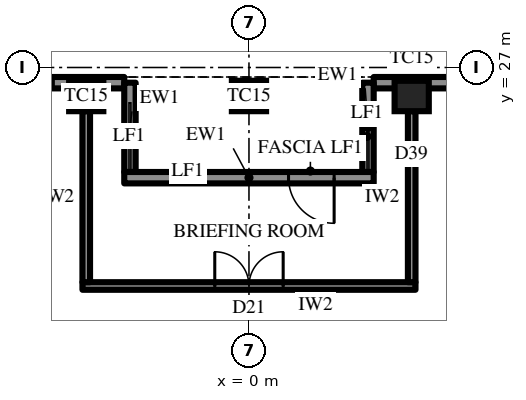
"""IFC4 building model, lengths in metres.
Left out: names, types, materials, properties, quantities, classifications, styles, units other than length and angle.
Written with IfcOpenShell. Run it as: python <this file> out.ifc"""

import sys

from ifc_helpers import new_model, si_unit, direction, frame, frame_2d, origin, origin_2d, place, context, subcontext, project, spatial, rectangle, extrude, element, fill, save


model = new_model("IFC4")
c1 = context("Model", 3, precision=1e-05, world=origin(), true_north=direction((0.0, 1.0)))
c2 = subcontext(c1, "Body", "Model", "MODEL_VIEW")
j1 = project(units=[si_unit("LENGTHUNIT", "METRE"), si_unit("PLANEANGLEUNIT", "RADIAN")], contexts=[c1])
p1 = place(None, origin())
s1 = spatial("IfcSite", under=j1, at=p1, CompositionType="ELEMENT")
p2 = place(p1, origin())
s2 = spatial("IfcBuilding", under=s1, at=p2, CompositionType="ELEMENT")
p3 = place(p2, frame((0.0, 0.0, 353.5)))
s3 = spatial("IfcBuildingStorey", under=s2, at=p3, CompositionType="ELEMENT", Elevation=353.5)
for number, where, z_axis, x_axis in (
    (1, (4.282, 26.25, 0.0), (0.0, 0.0, 1.0), (-1.0, 0.0, 0.0)),
    (2, (0.0, 26.25, 0.0), (0.0, 0.0, 1.0), (-1.0, 0.0, 0.0)),
    (3, (-4.282, 26.25, 0.0), (0.0, 0.0, 1.0), (-1.0, 0.0, 0.0)),
):
    element("IfcColumn", number, at=place(p3, frame(where, z_axis=z_axis, x_axis=x_axis)), inside=s3, PredefinedType="COLUMN", context=c2, shape_type="SweptSolid", body=[
        extrude(rectangle(XDim=0.9, YDim=0.8, at=origin_2d()), origin(), (0.0, 0.0, 1.0), 4.2),
    ])
p4 = place(p3, frame((12.846, 26.6, 0.0), z_axis=(0.0, 0.0, 1.0), x_axis=(-1.0, 0.0, 0.0)))
e4 = element("IfcWall", 4, at=p4, inside=s3, PredefinedType="SOLIDWALL", context=c2, shape_type="SweptSolid", body=[
    extrude(rectangle(XDim=9.564, YDim=0.3, at=frame_2d((4.782, 0.0))), origin(), (0.0, 0.0, 1.0), 2.9),
])
p5 = place(p4, frame((0.866, 0.0, 0.6)))
e5 = element("IfcOpeningElement", 5, at=p5, cuts=e4, PredefinedType="OPENING", context=c2, shape_type="SweptSolid", body=[
    extrude(rectangle(XDim=2.55, YDim=2.05, at=frame_2d((1.275, 1.025))), frame((0.0, 0.16, 0.0), z_axis=(0.0, -1.0, 0.0), x_axis=(1.0, 0.0, 0.0)), (0.0, 0.0, 1.0), 0.32),
])
p6 = place(p4, frame((5.823, 0.0, 0.0)))
e6 = element("IfcOpeningElement", 6, at=p6, cuts=e4, PredefinedType="OPENING", context=c2, shape_type="SweptSolid", body=[
    extrude(rectangle(XDim=1.2, YDim=2.4, at=frame_2d((0.6, 1.2))), frame((0.0, 0.16, 0.0), z_axis=(0.0, -1.0, 0.0), x_axis=(1.0, 0.0, 0.0)), (0.0, 0.0, 1.0), 0.32),
])
p7 = place(p3, frame((-3.282, 26.6, 0.0), z_axis=(0.0, 0.0, 1.0), x_axis=(-1.0, 0.0, 0.0)))
e7 = element("IfcWall", 7, at=p7, inside=s3, PredefinedType="SOLIDWALL", context=c2, shape_type="SweptSolid", body=[
    extrude(rectangle(XDim=9.564, YDim=0.3, at=frame_2d((4.782, 0.0))), origin(), (0.0, 0.0, 1.0), 2.9),
])
p8 = place(p7, frame((1.866, 0.0, 0.6)))
e8 = element("IfcOpeningElement", 8, at=p8, cuts=e7, PredefinedType="OPENING", context=c2, shape_type="SweptSolid", body=[
    extrude(rectangle(XDim=2.55, YDim=2.05, at=frame_2d((1.275, 1.025))), frame((0.0, 0.16, 0.0), z_axis=(0.0, -1.0, 0.0), x_axis=(1.0, 0.0, 0.0)), (0.0, 0.0, 1.0), 0.32),
])
p9 = place(p7, frame((6.148, 0.0, 0.6)))
e9 = element("IfcOpeningElement", 9, at=p9, cuts=e7, PredefinedType="OPENING", context=c2, shape_type="SweptSolid", body=[
    extrude(rectangle(XDim=2.55, YDim=2.05, at=frame_2d((1.275, 1.025))), frame((0.0, 0.16, 0.0), z_axis=(0.0, -1.0, 0.0), x_axis=(1.0, 0.0, 0.0)), (0.0, 0.0, 1.0), 0.32),
])
for number, where, z_axis, x_axis in (
    (10, (3.132, 26.6, 0.0), (0.0, 0.0, 1.0), (0.0, -1.0, 0.0)),
    (11, (-3.132, 26.6, 0.0), (0.0, 0.0, 1.0), (0.0, -1.0, 0.0)),
):
    element("IfcWall", number, at=place(p3, frame(where, z_axis=z_axis, x_axis=x_axis)), inside=s3, PredefinedType="SOLIDWALL", context=c2, shape_type="SweptSolid", body=[
        extrude(rectangle(XDim=2.35, YDim=0.3, at=frame_2d((1.175, 0.0))), origin(), (0.0, 0.0, 1.0), 2.9),
    ])
p10 = place(p3, frame((3.282, 24.1, 0.0), z_axis=(0.0, 0.0, 1.0), x_axis=(-1.0, 0.0, 0.0)))
e12 = element("IfcWall", 12, at=p10, inside=s3, PredefinedType="SOLIDWALL", context=c2, shape_type="SweptSolid", body=[
    extrude(rectangle(XDim=6.564, YDim=0.3, at=frame_2d((3.282, 0.0))), origin(), (0.0, 0.0, 1.0), 2.9),
])
p11 = place(p10, frame((1.041, 0.0, 0.0)))
e13 = element("IfcOpeningElement", 13, at=p11, cuts=e12, PredefinedType="OPENING", context=c2, shape_type="SweptSolid", body=[
    extrude(rectangle(XDim=1.2, YDim=2.4, at=frame_2d((0.6, 1.2))), frame((0.0, 0.16, 0.0), z_axis=(0.0, -1.0, 0.0), x_axis=(1.0, 0.0, 0.0)), (0.0, 0.0, 1.0), 0.32),
])
p12 = place(p3, frame((4.382, 21.25, 0.0), z_axis=(0.0, 0.0, 1.0), x_axis=(-1.0, 0.0, 0.0)))
e14 = element("IfcWall", 14, at=p12, inside=s3, PredefinedType="PARTITIONING", context=c2, shape_type="SweptSolid", body=[
    extrude(rectangle(XDim=8.764, YDim=0.2, at=frame_2d((4.382, 0.0))), origin(), (0.0, 0.0, 1.0), 4.0),
])
p13 = place(p12, frame((3.482, 0.0, 0.0)))
e15 = element("IfcOpeningElement", 15, at=p13, cuts=e14, PredefinedType="OPENING", context=c2, shape_type="SweptSolid", body=[
    extrude(rectangle(XDim=1.8, YDim=2.4, at=frame_2d((0.9, 1.2))), frame((0.0, 0.11, 0.0), z_axis=(0.0, -1.0, 0.0), x_axis=(1.0, 0.0, 0.0)), (0.0, 0.0, 1.0), 0.22),
])
for number, where, z_axis, x_axis in (
    (16, (4.282, 21.35, 0.0), (0.0, 0.0, 1.0), (0.0, 1.0, 0.0)),
    (17, (-4.282, 21.35, 0.0), (0.0, 0.0, 1.0), (0.0, 1.0, 0.0)),
):
    element("IfcWall", number, at=place(p3, frame(where, z_axis=z_axis, x_axis=x_axis)), inside=s3, PredefinedType="PARTITIONING", context=c2, shape_type="SweptSolid", body=[
        extrude(rectangle(XDim=4.5, YDim=0.2, at=frame_2d((2.25, 0.0))), origin(), (0.0, 0.0, 1.0), 2.992),
    ])
p14 = place(p8, origin())
e18 = element("IfcWindow", 18, at=p14, inside=s3, PartitioningType="SINGLE_PANEL", PredefinedType="WINDOW", context=c2, shape_type="SweptSolid", body=[
    extrude(rectangle(XDim=2.55, YDim=2.05, at=frame_2d((1.275, 1.025))), frame((0.0, 0.03, 0.0), z_axis=(0.0, -1.0, 0.0), x_axis=(1.0, 0.0, 0.0)), (0.0, 0.0, 1.0), 0.06),
])
fill(e8, e18)
p15 = place(p11, origin())
e19 = element("IfcDoor", 19, at=p15, inside=s3, OperationType="SINGLE_SWING_RIGHT", PredefinedType="DOOR", context=c2, shape_type="SweptSolid", body=[
    extrude(rectangle(XDim=1.2, YDim=2.4, at=frame_2d((0.6, 1.2))), frame((0.0, 0.025, 0.0), z_axis=(0.0, -1.0, 0.0), x_axis=(1.0, 0.0, 0.0)), (0.0, 0.0, 1.0), 0.05),
])
fill(e13, e19)
p16 = place(p13, frame((1.8, 0.0, 0.0), z_axis=(0.0, 0.0, 1.0), x_axis=(-1.0, 0.0, 0.0)))
e20 = element("IfcDoor", 20, at=p16, inside=s3, OperationType="DOUBLE_DOOR_SINGLE_SWING", PredefinedType="DOOR", context=c2, shape_type="SweptSolid", body=[
    extrude(rectangle(XDim=1.8, YDim=2.4, at=frame_2d((0.9, 1.2))), frame((0.0, 0.025, 0.0), z_axis=(0.0, -1.0, 0.0), x_axis=(1.0, 0.0, 0.0)), (0.0, 0.0, 1.0), 0.05),
])
fill(e15, e20)
save(model, sys.argv[1])
